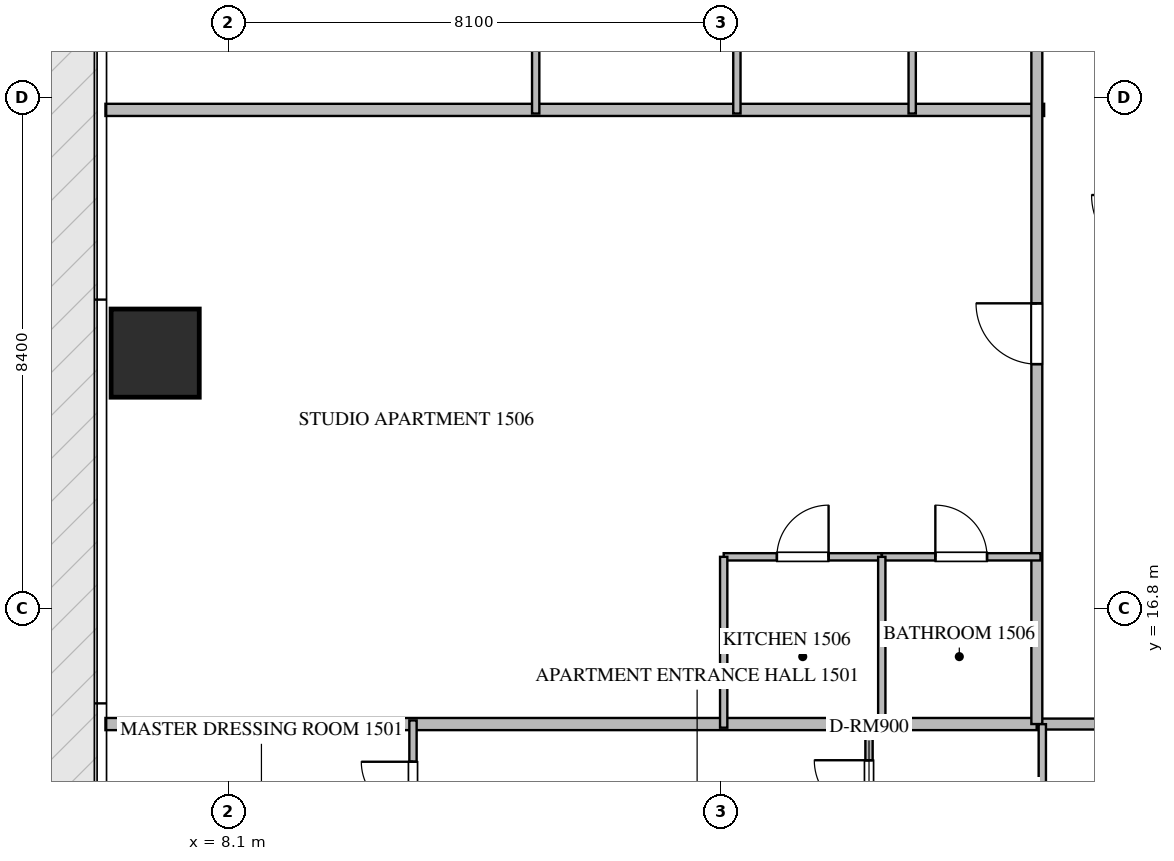
"""IFC4 building model, lengths in metres.
Left out: names, types, materials, properties, quantities, classifications, styles, units other than length and angle.
Written with IfcOpenShell. Run it as: python <this file> out.ifc"""

import sys

from ifc_helpers import new_model, si_unit, direction, frame, frame_2d, origin, origin_2d, place, context, subcontext, project, spatial, rectangle, extrude, source, transform, mapped, element, fill, save


model = new_model("IFC4")
c1 = context("Model", 3, precision=1e-05, world=origin(), true_north=direction((0.0, 1.0)))
c2 = subcontext(c1, "Body", "Model", "MODEL_VIEW")
j1 = project(units=[si_unit("LENGTHUNIT", "METRE"), si_unit("PLANEANGLEUNIT", "RADIAN")], contexts=[c1])
p1 = place(None, origin())
s1 = spatial("IfcSite", under=j1, at=p1, CompositionType="ELEMENT")
p2 = place(p1, origin())
s2 = spatial("IfcBuilding", under=s1, at=p2, CompositionType="ELEMENT")
p3 = place(p2, frame((0.0, 0.0, 64.2)))
s3 = spatial("IfcBuildingStorey", under=s2, at=p3, CompositionType="ELEMENT", Elevation=64.2)
m1 = source(origin(), c2, "Body", "SweptSolid", [
    extrude(rectangle(XDim=1.45, YDim=1.45, at=origin_2d()), origin(), (0.0, 0.0, 1.0), 3.75),
])
p4 = place(p3, frame((6.9, 21.0, -0.26), z_axis=(0.0, 0.0, 1.0), x_axis=(1.0, 0.0, 0.0)))
e1 = element("IfcColumn", 1, at=p4, inside=s3, PredefinedType="COLUMN", context=c2, shape_type="MappedRepresentation", body=[
    mapped(m1, transform((0.0, 0.0, 0.0), scale=1.0)),
])
p5 = place(p3, frame((6.082, 25.0, 0.0), z_axis=(0.0, 0.0, 1.0), x_axis=(1.0, 0.0, 0.0)))
e2 = element("IfcWall", 2, at=p5, inside=s3, PredefinedType="PARTITIONING", context=c2, shape_type="SweptSolid", body=[
    extrude(rectangle(XDim=15.438, YDim=0.2, at=frame_2d((7.719, 0.0))), origin(), (0.0, 0.0, 1.0), 3.49),
])
p6 = place(p3, frame((6.082, 14.9, 0.0), z_axis=(0.0, 0.0, 1.0), x_axis=(1.0, 0.0, 0.0)))
e3 = element("IfcWall", 3, at=p6, inside=s3, PredefinedType="PARTITIONING", context=c2, shape_type="SweptSolid", body=[
    extrude(rectangle(XDim=15.318, YDim=0.2, at=frame_2d((7.659, 0.0))), origin(), (0.0, 0.0, 1.0), 3.49),
])
p7 = place(p3, frame((21.402, 14.9, 0.0), z_axis=(0.0, 0.0, 1.0), x_axis=(1.0, 0.0, 0.0)))
e4 = element("IfcWall", 4, at=p7, inside=s3, PredefinedType="PARTITIONING", context=c2, shape_type="SweptSolid", body=[
    extrude(rectangle(XDim=21.996, YDim=0.18, at=frame_2d((10.998, 0.0))), origin(), (0.0, 0.0, 1.0), 3.49),
])
p8 = place(p7, frame((2.1, 0.0, 0.0)))
e5 = element("IfcOpeningElement", 5, at=p8, cuts=e4, PredefinedType="OPENING", context=c2, shape_type="SweptSolid", body=[
    extrude(rectangle(XDim=1.0, YDim=2.15, at=frame_2d((0.5, 1.075))), frame((0.0, 0.1, 0.0), z_axis=(0.0, -1.0, 0.0), x_axis=(1.0, 0.0, 0.0)), (0.0, 0.0, 1.0), 0.2),
])
p9 = place(p7, frame((6.719, 0.0, 0.0)))
e6 = element("IfcOpeningElement", 6, at=p9, cuts=e4, PredefinedType="OPENING", context=c2, shape_type="SweptSolid", body=[
    extrude(rectangle(XDim=1.0, YDim=2.15, at=frame_2d((0.5, 1.075))), frame((0.0, 0.1, 0.0), z_axis=(0.0, -1.0, 0.0), x_axis=(1.0, 0.0, 0.0)), (0.0, 0.0, 1.0), 0.2),
])
p10 = place(p7, frame((18.896, 0.0, 0.0)))
e7 = element("IfcOpeningElement", 7, at=p10, cuts=e4, PredefinedType="OPENING", context=c2, shape_type="SweptSolid", body=[
    extrude(rectangle(XDim=1.0, YDim=2.15, at=frame_2d((0.5, 1.075))), frame((0.0, 0.1, 0.0), z_axis=(0.0, -1.0, 0.0), x_axis=(1.0, 0.0, 0.0)), (0.0, 0.0, 1.0), 0.2),
])
p11 = place(p3, frame((21.4, 14.9, 0.0), z_axis=(0.0, 0.0, 1.0), x_axis=(0.0, 1.0, 0.0)))
e8 = element("IfcWall", 8, at=p11, inside=s3, PredefinedType="PARTITIONING", context=c2, shape_type="SweptSolid", body=[
    extrude(rectangle(XDim=20.6, YDim=0.18, at=frame_2d((10.3, 0.0))), origin(), (0.0, 0.0, 1.0), 3.49),
])
p12 = place(p11, frame((5.919, 0.0, 0.0)))
e9 = element("IfcOpeningElement", 9, at=p12, cuts=e8, PredefinedType="OPENING", context=c2, shape_type="SweptSolid", body=[
    extrude(rectangle(XDim=1.0, YDim=2.15, at=frame_2d((0.5, 1.075))), frame((0.0, 0.1, 0.0), z_axis=(0.0, -1.0, 0.0), x_axis=(1.0, 0.0, 0.0)), (0.0, 0.0, 1.0), 0.2),
])
p13 = place(p11, frame((17.64, 0.0, 0.0)))
e10 = element("IfcOpeningElement", 10, at=p13, cuts=e8, PredefinedType="OPENING", context=c2, shape_type="SweptSolid", body=[
    extrude(rectangle(XDim=1.0, YDim=2.15, at=frame_2d((0.5, 1.075))), frame((0.0, 0.1, 0.0), z_axis=(0.0, -1.0, 0.0), x_axis=(1.0, 0.0, 0.0)), (0.0, 0.0, 1.0), 0.2),
])
p14 = place(p3, frame((21.49, 12.15, 0.0), z_axis=(0.0, 0.0, 1.0), x_axis=(0.0, 1.0, 0.0)))
e11 = element("IfcWall", 11, at=p14, inside=s3, PredefinedType="PARTITIONING", context=c2, shape_type="SweptSolid", body=[
    extrude(rectangle(XDim=2.748, YDim=0.12, at=frame_2d((1.374, 0.0))), origin(), (0.0, 0.0, 1.0), 3.49),
])
p15 = place(p3, frame((18.64, 12.75, 0.0), z_axis=(0.0, 0.0, 1.0), x_axis=(0.0, 1.0, 0.0)))
e12 = element("IfcWall", 12, at=p15, inside=s3, PredefinedType="PARTITIONING", context=c2, shape_type="SweptSolid", body=[
    extrude(rectangle(XDim=2.21, YDim=0.12, at=frame_2d((1.105, 0.0))), origin(), (0.0, 0.0, 1.0), 3.49),
])
p16 = place(p15, frame((0.655, 0.0, 0.0)))
e13 = element("IfcOpeningElement", 13, at=p16, cuts=e12, PredefinedType="OPENING", context=c2, shape_type="SweptSolid", body=[
    extrude(rectangle(XDim=0.9, YDim=2.1, at=frame_2d((0.45, 1.05))), frame((0.0, 0.07, 0.0), z_axis=(0.0, -1.0, 0.0), x_axis=(1.0, 0.0, 0.0)), (0.0, 0.0, 1.0), 0.14),
])
p17 = place(p3, frame((11.14, 12.75, 0.0), z_axis=(0.0, 0.0, 1.0), x_axis=(0.0, 1.0, 0.0)))
e14 = element("IfcWall", 14, at=p17, inside=s3, PredefinedType="PARTITIONING", context=c2, shape_type="SweptSolid", body=[
    extrude(rectangle(XDim=2.21, YDim=0.12, at=frame_2d((1.105, 0.0))), origin(), (0.0, 0.0, 1.0), 3.49),
])
p18 = place(p17, frame((0.68, 0.0, 0.0)))
e15 = element("IfcOpeningElement", 15, at=p18, cuts=e14, PredefinedType="OPENING", context=c2, shape_type="SweptSolid", body=[
    extrude(rectangle(XDim=0.85, YDim=2.1, at=frame_2d((0.425, 1.05))), frame((0.0, 0.07, 0.0), z_axis=(0.0, -1.0, 0.0), x_axis=(1.0, 0.0, 0.0)), (0.0, 0.0, 1.0), 0.14),
])
p19 = place(p3, frame((16.25, 17.65, 0.0), z_axis=(0.0, 0.0, 1.0), x_axis=(1.0, 0.0, 0.0)))
e16 = element("IfcWall", 16, at=p19, inside=s3, PredefinedType="PARTITIONING", context=c2, shape_type="SweptSolid", body=[
    extrude(rectangle(XDim=2.6, YDim=0.12, at=frame_2d((1.3, 0.0))), origin(), (0.0, 0.0, 1.0), 3.49),
])
p20 = place(p19, frame((0.875, 0.0, 0.0)))
e17 = element("IfcOpeningElement", 17, at=p20, cuts=e16, PredefinedType="OPENING", context=c2, shape_type="SweptSolid", body=[
    extrude(rectangle(XDim=0.85, YDim=2.1, at=frame_2d((0.425, 1.05))), frame((0.0, 0.07, 0.0), z_axis=(0.0, -1.0, 0.0), x_axis=(1.0, 0.0, 0.0)), (0.0, 0.0, 1.0), 0.14),
])
p21 = place(p3, frame((18.852, 17.65, 0.0), z_axis=(0.0, 0.0, 1.0), x_axis=(1.0, 0.0, 0.0)))
e18 = element("IfcWall", 18, at=p21, inside=s3, PredefinedType="PARTITIONING", context=c2, shape_type="SweptSolid", body=[
    extrude(rectangle(XDim=2.608, YDim=0.12, at=frame_2d((1.304, 0.0))), origin(), (0.0, 0.0, 1.0), 3.49),
])
p22 = place(p21, frame((0.879, 0.0, 0.0)))
e19 = element("IfcOpeningElement", 19, at=p22, cuts=e18, PredefinedType="OPENING", context=c2, shape_type="SweptSolid", body=[
    extrude(rectangle(XDim=0.85, YDim=2.1, at=frame_2d((0.425, 1.05))), frame((0.0, 0.07, 0.0), z_axis=(0.0, -1.0, 0.0), x_axis=(1.0, 0.0, 0.0)), (0.0, 0.0, 1.0), 0.14),
])
for number, where, z_axis, x_axis in (
    (20, (18.85, 14.84, 0.0), (0.0, 0.0, 1.0), (0.0, 1.0, 0.0)),
    (21, (16.25, 14.84, 0.0), (0.0, 0.0, 1.0), (0.0, 1.0, 0.0)),
):
    element("IfcWall", number, at=place(p3, frame(where, z_axis=z_axis, x_axis=x_axis)), inside=s3, PredefinedType="PARTITIONING", context=c2, shape_type="SweptSolid", body=[
        extrude(rectangle(XDim=2.81, YDim=0.12, at=frame_2d((1.405, 0.0))), origin(), (0.0, 0.0, 1.0), 3.49),
    ])
for number, where, z_axis, x_axis in (
    (22, (13.158, 24.94, 0.0), (0.0, 0.0, 1.0), (0.0, 1.0, 0.0)),
    (23, (16.467, 24.94, 0.0), (0.0, 0.0, 1.0), (0.0, 1.0, 0.0)),
    (24, (19.35, 24.94, 0.0), (0.0, 0.0, 1.0), (0.0, 1.0, 0.0)),
):
    element("IfcWall", number, at=place(p3, frame(where, z_axis=z_axis, x_axis=x_axis)), inside=s3, PredefinedType="PARTITIONING", context=c2, shape_type="SweptSolid", body=[
        extrude(rectangle(XDim=6.06, YDim=0.12, at=frame_2d((3.03, 0.0))), origin(), (0.0, 0.0, 1.0), 3.49),
    ])
m2 = source(origin(), c2, "Body", "SweptSolid", [
    extrude(rectangle(XDim=1.0, YDim=2.15, at=frame_2d((0.5, 1.075))), frame((0.0, 0.025, 0.0), z_axis=(0.0, -1.0, 0.0), x_axis=(1.0, 0.0, 0.0)), (0.0, 0.0, 1.0), 0.05),
])
p23 = place(p12, origin())
e25 = element("IfcDoor", 25, at=p23, inside=s3, OperationType="SINGLE_SWING_RIGHT", PredefinedType="DOOR", context=c2, shape_type="MappedRepresentation", body=[
    mapped(m2, transform((0.0, 0.0, 0.0), scale=1.0)),
])
fill(e9, e25)
m3 = source(origin(), c2, "Body", "SweptSolid", [
    extrude(rectangle(XDim=0.9, YDim=2.1, at=frame_2d((0.45, 1.05))), frame((0.0, 0.025, 0.0), z_axis=(0.0, -1.0, 0.0), x_axis=(1.0, 0.0, 0.0)), (0.0, 0.0, 1.0), 0.05),
])
p24 = place(p16, origin())
e26 = element("IfcDoor", 26, at=p24, inside=s3, OperationType="SINGLE_SWING_RIGHT", PredefinedType="DOOR", context=c2, shape_type="MappedRepresentation", body=[
    mapped(m3, transform((0.0, 0.0, 0.0), scale=1.0)),
])
fill(e13, e26)
m4 = source(origin(), c2, "Body", "SweptSolid", [
    extrude(rectangle(XDim=0.85, YDim=2.1, at=frame_2d((0.425, 1.05))), frame((0.0, 0.025, 0.0), z_axis=(0.0, -1.0, 0.0), x_axis=(1.0, 0.0, 0.0)), (0.0, 0.0, 1.0), 0.05),
])
p25 = place(p18, origin())
e27 = element("IfcDoor", 27, at=p25, inside=s3, OperationType="SINGLE_SWING_RIGHT", PredefinedType="DOOR", context=c2, shape_type="MappedRepresentation", body=[
    mapped(m4, transform((0.0, 0.0, 0.0), scale=1.0)),
])
fill(e15, e27)
p26 = place(p20, origin())
e28 = element("IfcDoor", 28, at=p26, inside=s3, OperationType="SINGLE_SWING_RIGHT", PredefinedType="DOOR", context=c2, shape_type="MappedRepresentation", body=[
    mapped(m4, transform((0.0, 0.0, 0.0), scale=1.0)),
])
fill(e17, e28)
p27 = place(p22, origin())
e29 = element("IfcDoor", 29, at=p27, inside=s3, OperationType="SINGLE_SWING_LEFT", PredefinedType="DOOR", context=c2, shape_type="MappedRepresentation", body=[
    mapped(m4, transform((0.0, 0.0, 0.0), scale=1.0)),
])
fill(e19, e29)
save(model, sys.argv[1])
